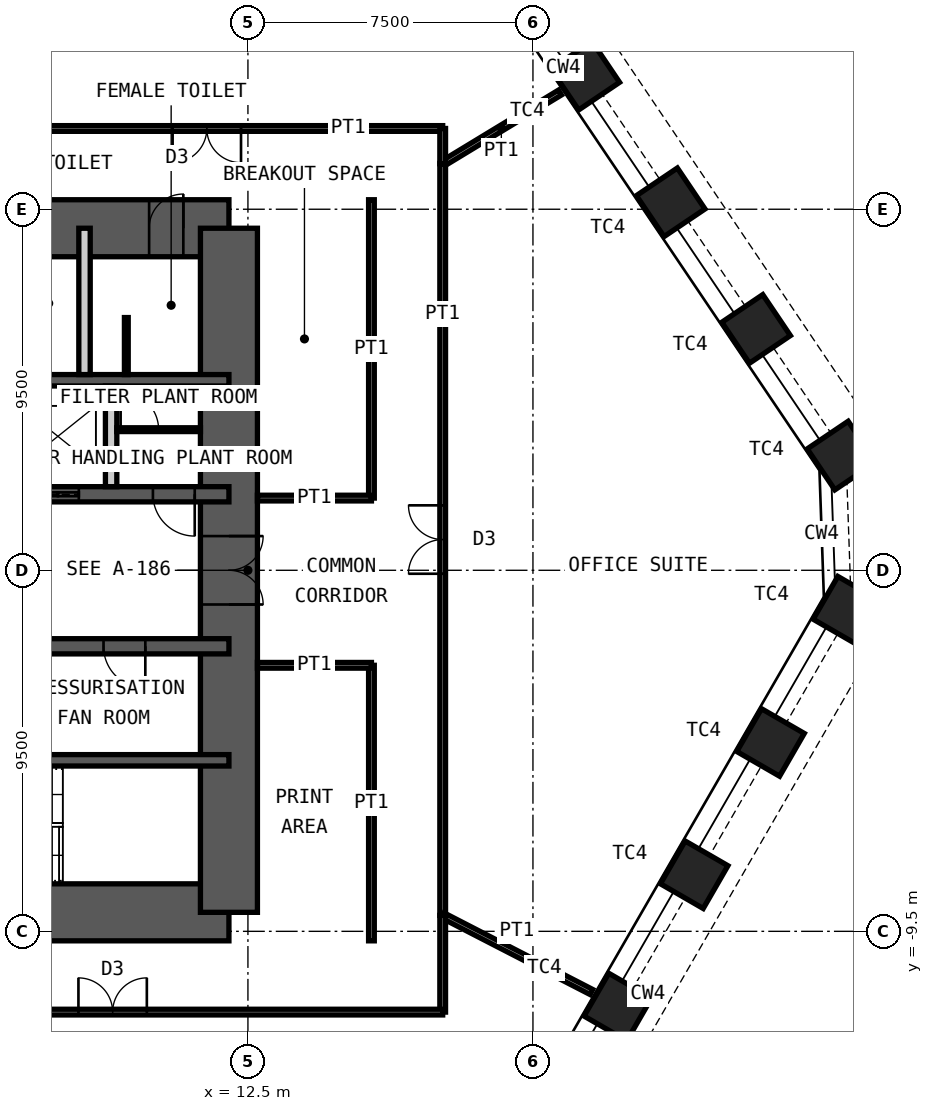
"""IFC4 building model, lengths in metres.
Left out: names, types, materials, properties, quantities, classifications, styles, units other than length and angle.
Written with IfcOpenShell. Run it as: python <this file> out.ifc"""

import sys

from ifc_helpers import new_model, si_unit, direction, frame, frame_2d, origin, origin_2d, place, context, subcontext, project, spatial, rectangle, hollow_rectangle, extrude, element, fill, save


model = new_model("IFC4")
c1 = context("Model", 3, precision=1e-05, world=origin(), true_north=direction((0.0, 1.0)))
c2 = subcontext(c1, "Body", "Model", "MODEL_VIEW")
j1 = project(units=[si_unit("LENGTHUNIT", "METRE"), si_unit("PLANEANGLEUNIT", "RADIAN")], contexts=[c1])
p1 = place(None, origin())
s1 = spatial("IfcSite", under=j1, at=p1, CompositionType="ELEMENT")
p2 = place(p1, origin())
s2 = spatial("IfcBuilding", under=s1, at=p2, CompositionType="ELEMENT")
p3 = place(p2, frame((0.0, 0.0, 140.8)))
s3 = spatial("IfcBuildingStorey", under=s2, at=p3, CompositionType="ELEMENT", Elevation=140.8)
for number, where, z_axis, x_axis in (
    (1, (21.377, 13.014, 0.0), (0.0, 0.0, 1.0), (-0.559, 0.829, 0.0)),
    (2, (23.625, 9.682, 0.0), (0.0, 0.0, 1.0), (-0.559, 0.829, 0.0)),
    (3, (25.872, 6.351, 0.0), (0.0, 0.0, 1.0), (-0.559, 0.829, 0.0)),
    (4, (28.119, 3.019, 0.0), (0.0, 0.0, 1.0), (-0.559, 0.829, 0.0)),
    (5, (28.261, -1.05, 0.0), (0.0, 0.0, 1.0), (0.5, 0.866, 0.0)),
    (6, (26.252, -4.53, 0.0), (0.0, 0.0, 1.0), (0.5, 0.866, 0.0)),
    (7, (24.242, -8.011, 0.0), (0.0, 0.0, 1.0), (0.5, 0.866, 0.0)),
    (8, (22.233, -11.491, 0.0), (0.0, 0.0, 1.0), (0.5, 0.866, 0.0)),
):
    element("IfcColumn", number, at=place(p3, frame(where, z_axis=z_axis, x_axis=x_axis)), inside=s3, PredefinedType="COLUMN", context=c2, shape_type="SweptSolid", body=[
        extrude(hollow_rectangle(XDim=1.3, YDim=1.3, WallThickness=0.1, at=origin_2d()), origin(), (0.0, 0.0, 1.0), 4.2),
    ])
p4 = place(p3, frame((-12.0, 9.0, 0.0), z_axis=(0.0, 0.0, 1.0), x_axis=(1.0, 0.0, 0.0)))
e9 = element("IfcWall", 9, at=p4, inside=s3, PredefinedType="SHEAR", context=c2, shape_type="SweptSolid", body=[
    extrude(rectangle(XDim=24.0, YDim=1.5, at=frame_2d((12.0, 0.0))), origin(), (0.0, 0.0, 1.0), 4.2),
])
p5 = place(p4, frame((10.4, 0.0, 0.0)))
e10 = element("IfcOpeningElement", 10, at=p5, cuts=e9, PredefinedType="OPENING", context=c2, shape_type="SweptSolid", body=[
    extrude(rectangle(XDim=1.0, YDim=2.1, at=frame_2d((0.5, 1.05))), frame((0.0, 0.76, 0.0), z_axis=(0.0, -1.0, 0.0), x_axis=(1.0, 0.0, 0.0)), (0.0, 0.0, 1.0), 1.52),
])
p6 = place(p4, frame((17.6, 0.0, 0.0)))
e11 = element("IfcOpeningElement", 11, at=p6, cuts=e9, PredefinedType="OPENING", context=c2, shape_type="SweptSolid", body=[
    extrude(rectangle(XDim=0.9, YDim=2.1, at=frame_2d((0.45, 1.05))), frame((0.0, 0.76, 0.0), z_axis=(0.0, -1.0, 0.0), x_axis=(1.0, 0.0, 0.0)), (0.0, 0.0, 1.0), 1.52),
])
p7 = place(p4, frame((21.9, 0.0, 0.0)))
e12 = element("IfcOpeningElement", 12, at=p7, cuts=e9, PredefinedType="OPENING", context=c2, shape_type="SweptSolid", body=[
    extrude(rectangle(XDim=0.9, YDim=2.1, at=frame_2d((0.45, 1.05))), frame((0.0, 0.76, 0.0), z_axis=(0.0, -1.0, 0.0), x_axis=(1.0, 0.0, 0.0)), (0.0, 0.0, 1.0), 1.52),
])
p8 = place(p3, frame((-12.0, -9.0, 0.0), z_axis=(0.0, 0.0, 1.0), x_axis=(1.0, 0.0, 0.0)))
e13 = element("IfcWall", 13, at=p8, inside=s3, PredefinedType="SHEAR", context=c2, shape_type="SweptSolid", body=[
    extrude(rectangle(XDim=24.0, YDim=1.5, at=frame_2d((12.0, 0.0))), origin(), (0.0, 0.0, 1.0), 4.2),
])
p9 = place(p8, frame((1.35, 0.0, 0.0)))
e14 = element("IfcOpeningElement", 14, at=p9, cuts=e13, PredefinedType="OPENING", context=c2, shape_type="SweptSolid", body=[
    extrude(rectangle(XDim=1.0, YDim=2.1, at=frame_2d((0.5, 1.05))), frame((0.0, 0.76, 0.0), z_axis=(0.0, -1.0, 0.0), x_axis=(1.0, 0.0, 0.0)), (0.0, 0.0, 1.0), 1.52),
])
p10 = place(p8, frame((5.325, 0.0, 0.0)))
e15 = element("IfcOpeningElement", 15, at=p10, cuts=e13, PredefinedType="OPENING", context=c2, shape_type="SweptSolid", body=[
    extrude(rectangle(XDim=1.15, YDim=2.1, at=frame_2d((0.575, 1.05))), frame((0.0, 0.76, 0.0), z_axis=(0.0, -1.0, 0.0), x_axis=(1.0, 0.0, 0.0)), (0.0, 0.0, 1.0), 1.52),
])
p11 = place(p8, frame((12.6, 0.0, 0.0)))
e16 = element("IfcOpeningElement", 16, at=p11, cuts=e13, PredefinedType="OPENING", context=c2, shape_type="SweptSolid", body=[
    extrude(rectangle(XDim=1.0, YDim=2.1, at=frame_2d((0.5, 1.05))), frame((0.0, 0.76, 0.0), z_axis=(0.0, -1.0, 0.0), x_axis=(1.0, 0.0, 0.0)), (0.0, 0.0, 1.0), 1.52),
])
p12 = place(p3, frame((12.0, -9.0, 0.0), z_axis=(0.0, 0.0, 1.0), x_axis=(0.0, 1.0, 0.0)))
e17 = element("IfcWall", 17, at=p12, inside=s3, PredefinedType="SHEAR", context=c2, shape_type="SweptSolid", body=[
    extrude(rectangle(XDim=18.0, YDim=1.5, at=frame_2d((9.0, 0.0))), origin(), (0.0, 0.0, 1.0), 4.2),
])
p13 = place(p12, frame((8.1, 0.0, 0.0)))
e18 = element("IfcOpeningElement", 18, at=p13, cuts=e17, PredefinedType="OPENING", context=c2, shape_type="SweptSolid", body=[
    extrude(rectangle(XDim=1.8, YDim=2.1, at=frame_2d((0.9, 1.05))), frame((0.0, 0.76, 0.0), z_axis=(0.0, -1.0, 0.0), x_axis=(1.0, 0.0, 0.0)), (0.0, 0.0, 1.0), 1.52),
])
p14 = place(p3, frame((-12.0, 5.0, 0.0), z_axis=(0.0, 0.0, 1.0), x_axis=(1.0, 0.0, 0.0)))
e19 = element("IfcWall", 19, at=p14, inside=s3, PredefinedType="SHEAR", context=c2, shape_type="SweptSolid", body=[
    extrude(rectangle(XDim=24.0, YDim=0.3, at=frame_2d((12.0, 0.0))), origin(), (0.0, 0.0, 1.0), 4.2),
])
p15 = place(p3, frame((-12.0, 2.0, 0.0), z_axis=(0.0, 0.0, 1.0), x_axis=(1.0, 0.0, 0.0)))
e20 = element("IfcWall", 20, at=p15, inside=s3, PredefinedType="SHEAR", context=c2, shape_type="SweptSolid", body=[
    extrude(rectangle(XDim=24.0, YDim=0.4, at=frame_2d((12.0, 0.0))), origin(), (0.0, 0.0, 1.0), 4.2),
])
p16 = place(p15, frame((2.4, 0.0, 0.0)))
e21 = element("IfcOpeningElement", 21, at=p16, cuts=e20, PredefinedType="OPENING", context=c2, shape_type="SweptSolid", body=[
    extrude(rectangle(XDim=1.1, YDim=2.1, at=frame_2d((0.55, 1.05))), frame((0.0, 0.21, 0.0), z_axis=(0.0, -1.0, 0.0), x_axis=(1.0, 0.0, 0.0)), (0.0, 0.0, 1.0), 0.42),
])
p17 = place(p15, frame((22.0, 0.0, 0.0)))
e22 = element("IfcOpeningElement", 22, at=p17, cuts=e20, PredefinedType="OPENING", context=c2, shape_type="SweptSolid", body=[
    extrude(rectangle(XDim=1.1, YDim=2.1, at=frame_2d((0.55, 1.05))), frame((0.0, 0.21, 0.0), z_axis=(0.0, -1.0, 0.0), x_axis=(1.0, 0.0, 0.0)), (0.0, 0.0, 1.0), 0.42),
])
p18 = place(p15, frame((10.15, 0.0, 0.0)))
e23 = element("IfcOpeningElement", 23, at=p18, cuts=e20, PredefinedType="OPENING", context=c2, shape_type="SweptSolid", body=[
    extrude(rectangle(XDim=1.0, YDim=2.1, at=frame_2d((0.5, 1.05))), frame((0.0, 0.21, 0.0), z_axis=(0.0, -1.0, 0.0), x_axis=(1.0, 0.0, 0.0)), (0.0, 0.0, 1.0), 0.42),
])
p19 = place(p15, frame((6.9, 0.0, 0.0)))
e24 = element("IfcOpeningElement", 24, at=p19, cuts=e20, PredefinedType="OPENING", context=c2, shape_type="SweptSolid", body=[
    extrude(rectangle(XDim=1.0, YDim=2.1, at=frame_2d((0.5, 1.05))), frame((0.0, 0.21, 0.0), z_axis=(0.0, -1.0, 0.0), x_axis=(1.0, 0.0, 0.0)), (0.0, 0.0, 1.0), 0.42),
])
p20 = place(p15, frame((13.35, 0.0, 0.0)))
e25 = element("IfcOpeningElement", 25, at=p20, cuts=e20, PredefinedType="OPENING", context=c2, shape_type="SweptSolid", body=[
    extrude(rectangle(XDim=1.1, YDim=2.4, at=frame_2d((0.55, 1.2))), frame((0.0, 0.21, 0.0), z_axis=(0.0, -1.0, 0.0), x_axis=(1.0, 0.0, 0.0)), (0.0, 0.0, 1.0), 0.42),
])
p21 = place(p15, frame((16.15, 0.0, 0.0)))
e26 = element("IfcOpeningElement", 26, at=p21, cuts=e20, PredefinedType="OPENING", context=c2, shape_type="SweptSolid", body=[
    extrude(rectangle(XDim=1.1, YDim=2.4, at=frame_2d((0.55, 1.2))), frame((0.0, 0.21, 0.0), z_axis=(0.0, -1.0, 0.0), x_axis=(1.0, 0.0, 0.0)), (0.0, 0.0, 1.0), 0.42),
])
p22 = place(p15, frame((18.95, 0.0, 0.0)))
e27 = element("IfcOpeningElement", 27, at=p22, cuts=e20, PredefinedType="OPENING", context=c2, shape_type="SweptSolid", body=[
    extrude(rectangle(XDim=1.1, YDim=2.4, at=frame_2d((0.55, 1.2))), frame((0.0, 0.21, 0.0), z_axis=(0.0, -1.0, 0.0), x_axis=(1.0, 0.0, 0.0)), (0.0, 0.0, 1.0), 0.42),
])
p23 = place(p3, frame((-12.0, -2.0, 0.0), z_axis=(0.0, 0.0, 1.0), x_axis=(1.0, 0.0, 0.0)))
e28 = element("IfcWall", 28, at=p23, inside=s3, PredefinedType="SHEAR", context=c2, shape_type="SweptSolid", body=[
    extrude(rectangle(XDim=24.0, YDim=0.4, at=frame_2d((12.0, 0.0))), origin(), (0.0, 0.0, 1.0), 4.2),
])
p24 = place(p23, frame((1.1, 0.0, 0.0)))
e29 = element("IfcOpeningElement", 29, at=p24, cuts=e28, PredefinedType="OPENING", context=c2, shape_type="SweptSolid", body=[
    extrude(rectangle(XDim=1.1, YDim=2.1, at=frame_2d((0.55, 1.05))), frame((0.0, 0.21, 0.0), z_axis=(0.0, -1.0, 0.0), x_axis=(1.0, 0.0, 0.0)), (0.0, 0.0, 1.0), 0.42),
])
p25 = place(p23, frame((13.55, 0.0, 0.0)))
e30 = element("IfcOpeningElement", 30, at=p25, cuts=e28, PredefinedType="OPENING", context=c2, shape_type="SweptSolid", body=[
    extrude(rectangle(XDim=1.1, YDim=2.1, at=frame_2d((0.55, 1.05))), frame((0.0, 0.21, 0.0), z_axis=(0.0, -1.0, 0.0), x_axis=(1.0, 0.0, 0.0)), (0.0, 0.0, 1.0), 0.42),
])
p26 = place(p23, frame((20.7, 0.0, 0.0)))
e31 = element("IfcOpeningElement", 31, at=p26, cuts=e28, PredefinedType="OPENING", context=c2, shape_type="SweptSolid", body=[
    extrude(rectangle(XDim=1.1, YDim=2.1, at=frame_2d((0.55, 1.05))), frame((0.0, 0.21, 0.0), z_axis=(0.0, -1.0, 0.0), x_axis=(1.0, 0.0, 0.0)), (0.0, 0.0, 1.0), 0.42),
])
p27 = place(p23, frame((4.0, 0.0, 0.0)))
e32 = element("IfcOpeningElement", 32, at=p27, cuts=e28, PredefinedType="OPENING", context=c2, shape_type="SweptSolid", body=[
    extrude(rectangle(XDim=1.0, YDim=2.1, at=frame_2d((0.5, 1.05))), frame((0.0, 0.21, 0.0), z_axis=(0.0, -1.0, 0.0), x_axis=(1.0, 0.0, 0.0)), (0.0, 0.0, 1.0), 0.42),
])
p28 = place(p3, frame((-12.0, -5.0, 0.0), z_axis=(0.0, 0.0, 1.0), x_axis=(1.0, 0.0, 0.0)))
e33 = element("IfcWall", 33, at=p28, inside=s3, PredefinedType="SHEAR", context=c2, shape_type="SweptSolid", body=[
    extrude(rectangle(XDim=24.0, YDim=0.3, at=frame_2d((12.0, 0.0))), origin(), (0.0, 0.0, 1.0), 4.2),
])
p29 = place(p3, frame((8.2, 5.15, 0.0), z_axis=(0.0, 0.0, 1.0), x_axis=(0.0, 1.0, 0.0)))
e34 = element("IfcWall", 34, at=p29, inside=s3, PredefinedType="PARTITIONING", context=c2, shape_type="SweptSolid", body=[
    extrude(rectangle(XDim=3.85, YDim=0.3, at=frame_2d((1.925, 0.0))), origin(), (0.0, 0.0, 1.0), 3.98),
])
p30 = place(p3, frame((8.9, 2.2, 0.0), z_axis=(0.0, 0.0, 1.0), x_axis=(0.0, 1.0, 0.0)))
e35 = element("IfcWall", 35, at=p30, inside=s3, PredefinedType="PARTITIONING", context=c2, shape_type="SweptSolid", body=[
    extrude(rectangle(XDim=2.65, YDim=0.3, at=frame_2d((1.325, 0.0))), origin(), (0.0, 0.0, 1.0), 3.98),
])
p31 = place(p3, frame((9.05, 3.7, 0.0), z_axis=(0.0, 0.0, 1.0), x_axis=(1.0, 0.0, 0.0)))
e36 = element("IfcWall", 36, at=p31, inside=s3, PredefinedType="PARTITIONING", context=c2, shape_type="SweptSolid", body=[
    extrude(rectangle(XDim=2.2, YDim=0.1, at=frame_2d((1.1, 0.0))), origin(), (0.0, 0.0, 1.0), 3.98),
])
p32 = place(p31, frame((0.1, 0.0, 0.0)))
e37 = element("IfcOpeningElement", 37, at=p32, cuts=e36, PredefinedType="OPENING", context=c2, shape_type="SweptSolid", body=[
    extrude(rectangle(XDim=1.0, YDim=2.4, at=frame_2d((0.5, 1.2))), frame((0.0, 0.06, 0.0), z_axis=(0.0, -1.0, 0.0), x_axis=(1.0, 0.0, 0.0)), (0.0, 0.0, 1.0), 0.12),
])
p33 = place(p3, frame((9.3, 5.15, 0.0), z_axis=(0.0, 0.0, 1.0), x_axis=(0.0, 1.0, 0.0)))
e38 = element("IfcWall", 38, at=p33, inside=s3, PredefinedType="PARTITIONING", context=c2, shape_type="SweptSolid", body=[
    extrude(rectangle(XDim=1.5, YDim=0.1, at=frame_2d((0.75, 0.0))), origin(), (0.0, 0.0, 1.0), 2.1),
])
p34 = place(p3, frame((20.711, 12.571, 0.0), z_axis=(0.0, 0.0, 1.0), x_axis=(-0.854862500505, -0.518854608952, 0.0)))
e39 = element("IfcWall", 39, at=p34, inside=s3, PredefinedType="PARTITIONING", context=c2, shape_type="SweptSolid", body=[
    extrude(rectangle(XDim=3.61, YDim=0.15, at=frame_2d((1.805, 0.0))), origin(), (0.0, 0.0, 1.0), 3.33),
])
p35 = place(p3, frame((17.625, 10.698, 0.0), z_axis=(0.0, 0.0, 1.0), x_axis=(0.0, -1.0, 0.0)))
e40 = element("IfcWall", 40, at=p35, inside=s3, PredefinedType="PARTITIONING", context=c2, shape_type="SweptSolid", body=[
    extrude(rectangle(XDim=19.778, YDim=0.15, at=frame_2d((9.889, 0.0))), origin(), (0.0, 0.0, 1.0), 4.03),
])
p36 = place(p35, frame((8.989, 0.0, 0.0)))
e41 = element("IfcOpeningElement", 41, at=p36, cuts=e40, PredefinedType="OPENING", context=c2, shape_type="SweptSolid", body=[
    extrude(rectangle(XDim=1.8, YDim=2.4, at=frame_2d((0.9, 1.2))), frame((0.0, 0.085, 0.0), z_axis=(0.0, -1.0, 0.0), x_axis=(1.0, 0.0, 0.0)), (0.0, 0.0, 1.0), 0.17),
])
p37 = place(p3, frame((21.538, -11.096, 0.0), z_axis=(0.0, 0.0, 1.0), x_axis=(-0.888982083501, 0.457941977999, 0.0)))
e42 = element("IfcWall", 42, at=p37, inside=s3, PredefinedType="PARTITIONING", context=c2, shape_type="SweptSolid", body=[
    extrude(rectangle(XDim=4.401, YDim=0.15, at=frame_2d((2.201, 0.0))), origin(), (0.0, 0.0, 1.0), 3.33),
])
p38 = place(p3, frame((17.625, -9.08, 0.0), z_axis=(0.0, 0.0, 1.0), x_axis=(0.0, -1.0, 0.0)))
e43 = element("IfcWall", 43, at=p38, inside=s3, PredefinedType="PARTITIONING", context=c2, shape_type="SweptSolid", body=[
    extrude(rectangle(XDim=2.545, YDim=0.15, at=frame_2d((1.272, 0.0))), origin(), (0.0, 0.0, 1.0), 4.03),
])
p39 = place(p3, frame((17.625, -11.625, 0.0), z_axis=(0.0, 0.0, 1.0), x_axis=(-1.0, 0.0, 0.0)))
e44 = element("IfcWall", 44, at=p39, inside=s3, PredefinedType="PARTITIONING", context=c2, shape_type="SweptSolid", body=[
    extrude(rectangle(XDim=17.37, YDim=0.15, at=frame_2d((8.685, 0.0))), origin(), (0.0, 0.0, 1.0), 4.03),
])
p40 = place(p39, frame((7.785, 0.0, 0.0)))
e45 = element("IfcOpeningElement", 45, at=p40, cuts=e44, PredefinedType="OPENING", context=c2, shape_type="SweptSolid", body=[
    extrude(rectangle(XDim=1.8, YDim=2.4, at=frame_2d((0.9, 1.2))), frame((0.0, 0.085, 0.0), z_axis=(0.0, -1.0, 0.0), x_axis=(1.0, 0.0, 0.0)), (0.0, 0.0, 1.0), 0.17),
])
p41 = place(p3, frame((10.852, 24.209, 0.0), z_axis=(0.0, 0.0, 1.0), x_axis=(-0.40904878746, -0.912512514696, 0.0)))
e46 = element("IfcWall", 46, at=p41, inside=s3, PredefinedType="PARTITIONING", context=c2, shape_type="SweptSolid", body=[
    extrude(rectangle(XDim=13.79, YDim=0.15, at=frame_2d((6.895, 0.0))), origin(), (0.0, 0.0, 1.0), 2.93),
])
p42 = place(p3, frame((5.211, 11.625, 0.0), z_axis=(0.0, 0.0, 1.0), x_axis=(1.0, 0.0, 0.0)))
e47 = element("IfcWall", 47, at=p42, inside=s3, PredefinedType="PARTITIONING", context=c2, shape_type="SweptSolid", body=[
    extrude(rectangle(XDim=12.414, YDim=0.15, at=frame_2d((6.207, 0.0))), origin(), (0.0, 0.0, 1.0), 4.03),
])
p43 = place(p42, frame((5.307, 0.0, 0.0)))
e48 = element("IfcOpeningElement", 48, at=p43, cuts=e47, PredefinedType="OPENING", context=c2, shape_type="SweptSolid", body=[
    extrude(rectangle(XDim=1.8, YDim=2.4, at=frame_2d((0.9, 1.2))), frame((0.0, 0.085, 0.0), z_axis=(0.0, -1.0, 0.0), x_axis=(1.0, 0.0, 0.0)), (0.0, 0.0, 1.0), 0.17),
])
p44 = place(p3, frame((17.625, 11.625, 0.0), z_axis=(0.0, 0.0, 1.0), x_axis=(0.0, -1.0, 0.0)))
e49 = element("IfcWall", 49, at=p44, inside=s3, PredefinedType="PARTITIONING", context=c2, shape_type="SweptSolid", body=[
    extrude(rectangle(XDim=0.927, YDim=0.15, at=frame_2d((0.464, 0.0))), origin(), (0.0, 0.0, 1.0), 4.03),
])
p45 = place(p3, frame((15.75, 1.9, 0.0), z_axis=(0.0, 0.0, 1.0), x_axis=(0.0, 1.0, 0.0)))
e50 = element("IfcWall", 50, at=p45, inside=s3, PredefinedType="PARTITIONING", context=c2, shape_type="SweptSolid", body=[
    extrude(rectangle(XDim=7.85, YDim=0.15, at=frame_2d((3.925, 0.0))), origin(), (0.0, 0.0, 1.0), 4.03),
])
p46 = place(p3, frame((12.75, 1.9, 0.0), z_axis=(0.0, 0.0, 1.0), x_axis=(1.0, 0.0, 0.0)))
e51 = element("IfcWall", 51, at=p46, inside=s3, PredefinedType="PARTITIONING", context=c2, shape_type="SweptSolid", body=[
    extrude(rectangle(XDim=3.0, YDim=0.15, at=frame_2d((1.5, 0.0))), origin(), (0.0, 0.0, 1.0), 2.93),
])
p47 = place(p3, frame((15.75, -9.75, 0.0), z_axis=(0.0, 0.0, 1.0), x_axis=(0.0, 1.0, 0.0)))
e52 = element("IfcWall", 52, at=p47, inside=s3, PredefinedType="PARTITIONING", context=c2, shape_type="SweptSolid", body=[
    extrude(rectangle(XDim=7.25, YDim=0.15, at=frame_2d((3.625, 0.0))), origin(), (0.0, 0.0, 1.0), 4.03),
])
p48 = place(p3, frame((12.75, -2.5, 0.0), z_axis=(0.0, 0.0, 1.0), x_axis=(1.0, 0.0, 0.0)))
e53 = element("IfcWall", 53, at=p48, inside=s3, PredefinedType="PARTITIONING", context=c2, shape_type="SweptSolid", body=[
    extrude(rectangle(XDim=3.0, YDim=0.15, at=frame_2d((1.5, 0.0))), origin(), (0.0, 0.0, 1.0), 3.33),
])
p49 = place(p7, origin())
e54 = element("IfcDoor", 54, at=p49, inside=s3, OperationType="SINGLE_SWING_LEFT", PredefinedType="DOOR", context=c2, shape_type="SweptSolid", body=[
    extrude(rectangle(XDim=0.9, YDim=2.1, at=frame_2d((0.45, 1.05))), frame((0.0, 0.025, 0.0), z_axis=(0.0, -1.0, 0.0), x_axis=(1.0, 0.0, 0.0)), (0.0, 0.0, 1.0), 0.05),
])
fill(e12, e54)
p50 = place(p17, origin())
e55 = element("IfcDoor", 55, at=p50, inside=s3, OperationType="SINGLE_SWING_RIGHT", PredefinedType="DOOR", context=c2, shape_type="SweptSolid", body=[
    extrude(rectangle(XDim=1.1, YDim=2.1, at=frame_2d((0.55, 1.05))), frame((0.0, 0.025, 0.0), z_axis=(0.0, -1.0, 0.0), x_axis=(1.0, 0.0, 0.0)), (0.0, 0.0, 1.0), 0.05),
])
fill(e22, e55)
p51 = place(p26, origin())
e56 = element("IfcDoor", 56, at=p51, inside=s3, OperationType="SINGLE_SWING_RIGHT", PredefinedType="DOOR", context=c2, shape_type="SweptSolid", body=[
    extrude(rectangle(XDim=1.1, YDim=2.1, at=frame_2d((0.55, 1.05))), frame((0.0, 0.025, 0.0), z_axis=(0.0, -1.0, 0.0), x_axis=(1.0, 0.0, 0.0)), (0.0, 0.0, 1.0), 0.05),
])
fill(e31, e56)
p52 = place(p13, origin())
e57 = element("IfcDoor", 57, at=p52, inside=s3, OperationType="DOUBLE_DOOR_DOUBLE_SWING", PredefinedType="DOOR", context=c2, shape_type="SweptSolid", body=[
    extrude(rectangle(XDim=1.8, YDim=2.1, at=frame_2d((0.9, 1.05))), frame((0.0, 0.025, 0.0), z_axis=(0.0, -1.0, 0.0), x_axis=(1.0, 0.0, 0.0)), (0.0, 0.0, 1.0), 0.05),
])
fill(e18, e57)
p53 = place(p22, origin())
e58 = element("IfcDoor", 58, at=p53, inside=s3, OperationType="DOUBLE_DOOR_SLIDING", PredefinedType="DOOR", context=c2, shape_type="SweptSolid", body=[
    extrude(rectangle(XDim=1.1, YDim=2.4, at=frame_2d((0.55, 1.2))), frame((0.0, 0.025, 0.0), z_axis=(0.0, -1.0, 0.0), x_axis=(1.0, 0.0, 0.0)), (0.0, 0.0, 1.0), 0.05),
])
fill(e27, e58)
p54 = place(p32, origin())
e59 = element("IfcDoor", 59, at=p54, inside=s3, OperationType="SINGLE_SWING_RIGHT", PredefinedType="DOOR", context=c2, shape_type="SweptSolid", body=[
    extrude(rectangle(XDim=1.0, YDim=2.4, at=frame_2d((0.5, 1.2))), frame((0.0, 0.025, 0.0), z_axis=(0.0, -1.0, 0.0), x_axis=(1.0, 0.0, 0.0)), (0.0, 0.0, 1.0), 0.05),
])
fill(e37, e59)
p55 = place(p36, origin())
e60 = element("IfcDoor", 60, at=p55, inside=s3, OperationType="DOUBLE_DOOR_DOUBLE_SWING", PredefinedType="DOOR", context=c2, shape_type="SweptSolid", body=[
    extrude(rectangle(XDim=1.8, YDim=2.4, at=frame_2d((0.9, 1.2))), frame((0.0, 0.025, 0.0), z_axis=(0.0, -1.0, 0.0), x_axis=(1.0, 0.0, 0.0)), (0.0, 0.0, 1.0), 0.05),
])
fill(e41, e60)
p56 = place(p40, origin())
e61 = element("IfcDoor", 61, at=p56, inside=s3, OperationType="DOUBLE_DOOR_DOUBLE_SWING", PredefinedType="DOOR", context=c2, shape_type="SweptSolid", body=[
    extrude(rectangle(XDim=1.8, YDim=2.4, at=frame_2d((0.9, 1.2))), frame((0.0, 0.025, 0.0), z_axis=(0.0, -1.0, 0.0), x_axis=(1.0, 0.0, 0.0)), (0.0, 0.0, 1.0), 0.05),
])
fill(e45, e61)
p57 = place(p43, origin())
e62 = element("IfcDoor", 62, at=p57, inside=s3, OperationType="DOUBLE_DOOR_DOUBLE_SWING", PredefinedType="DOOR", context=c2, shape_type="SweptSolid", body=[
    extrude(rectangle(XDim=1.8, YDim=2.4, at=frame_2d((0.9, 1.2))), frame((0.0, 0.025, 0.0), z_axis=(0.0, -1.0, 0.0), x_axis=(1.0, 0.0, 0.0)), (0.0, 0.0, 1.0), 0.05),
])
fill(e48, e62)
save(model, sys.argv[1])
